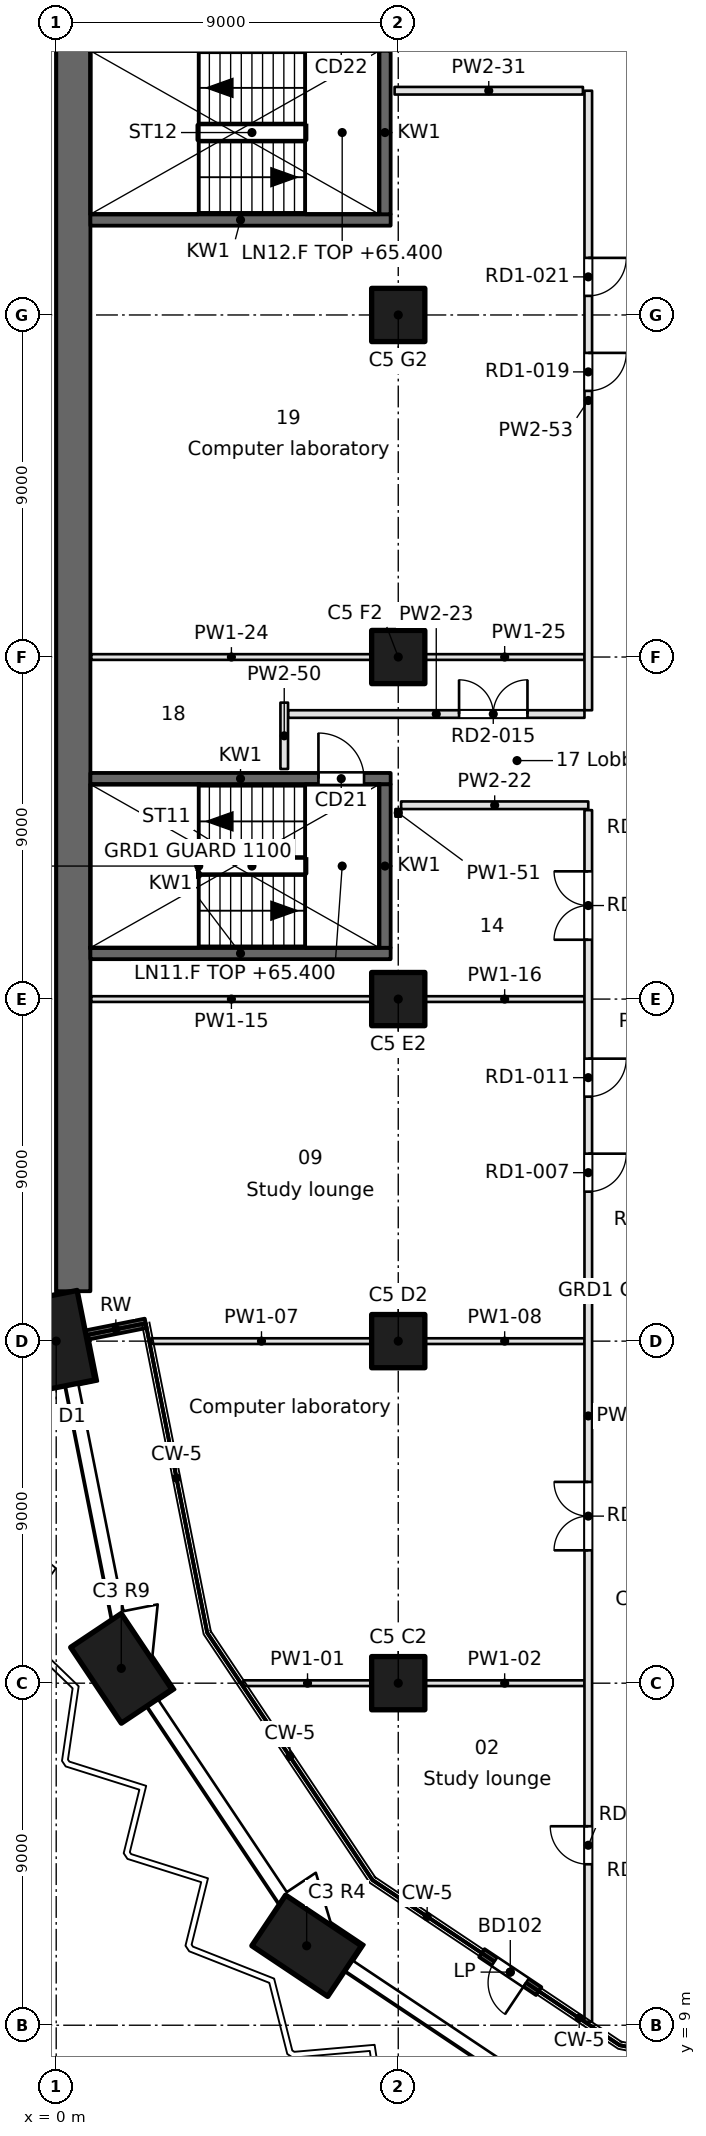
"""IFC4 building model, lengths in metres.
Left out: names, types, materials, properties, quantities, classifications, styles, units other than length and angle.
Written with IfcOpenShell. Run it as: python <this file> out.ifc"""

import sys

from ifc_helpers import new_model, si_unit, direction, frame, frame_2d, origin, origin_2d, place, context, subcontext, project, spatial, rectangle, extrude, element, fill, save


model = new_model("IFC4")
c1 = context("Model", 3, precision=1e-05, world=origin(), true_north=direction((0.0, 1.0)))
c2 = subcontext(c1, "Body", "Model", "MODEL_VIEW")
j1 = project(units=[si_unit("LENGTHUNIT", "METRE"), si_unit("PLANEANGLEUNIT", "RADIAN")], contexts=[c1])
p1 = place(None, origin())
s1 = spatial("IfcSite", under=j1, at=p1, CompositionType="ELEMENT")
p2 = place(p1, origin())
s2 = spatial("IfcBuilding", under=s1, at=p2, CompositionType="ELEMENT")
p3 = place(p2, frame((0.0, 0.0, 65.4)))
s3 = spatial("IfcBuildingStorey", under=s2, at=p3, CompositionType="ELEMENT", Elevation=65.4)
for number, where, z_axis, x_axis in (
    (1, (6.59, 11.09, 0.0), (0.0, 0.0, 1.0), (-0.831, 0.556, 0.0)),
    (2, (1.713, 18.39, 0.0), (0.0, 0.0, 1.0), (-0.556, 0.831, 0.0)),
    (3, (0.0, 27.0, 0.0), (0.0, 0.0, 1.0), (-0.195, 0.981, 0.0)),
):
    element("IfcColumn", number, at=place(p3, frame(where, z_axis=z_axis, x_axis=x_axis)), inside=s3, PredefinedType="COLUMN", context=c2, shape_type="SweptSolid", body=[
        extrude(rectangle(XDim=2.4, YDim=1.6, at=origin_2d()), origin(), (0.0, 0.0, 1.0), 3.7),
    ])
for number, where, z_axis, x_axis in (
    (4, (9.0, 18.0, 0.0), (0.0, 0.0, 1.0), (1.0, 0.0, 0.0)),
    (5, (9.0, 27.0, 0.0), (0.0, 0.0, 1.0), (1.0, 0.0, 0.0)),
    (6, (9.0, 36.0, 0.0), (0.0, 0.0, 1.0), (1.0, 0.0, 0.0)),
    (7, (9.0, 45.0, 0.0), (0.0, 0.0, 1.0), (1.0, 0.0, 0.0)),
    (8, (9.0, 54.0, 0.0), (0.0, 0.0, 1.0), (1.0, 0.0, 0.0)),
):
    element("IfcColumn", number, at=place(p3, frame(where, z_axis=z_axis, x_axis=x_axis)), inside=s3, PredefinedType="COLUMN", context=c2, shape_type="SweptSolid", body=[
        extrude(rectangle(XDim=1.4, YDim=1.4, at=origin_2d()), origin(), (0.0, 0.0, 1.0), 3.7),
    ])
p4 = place(p3, frame((0.45, 94.5, 0.0), z_axis=(0.0, 0.0, 1.0), x_axis=(0.0, -1.0, 0.0)))
e9 = element("IfcWall", 9, at=p4, inside=s3, PredefinedType="SHEAR", context=c2, shape_type="SweptSolid", body=[
    extrude(rectangle(XDim=66.187, YDim=0.9, at=frame_2d((33.094, 0.0))), origin(), (0.0, 0.0, 1.0), 3.7),
])
p5 = place(p3, frame((0.784, 27.157, 0.0), z_axis=(0.0, 0.0, 1.0), x_axis=(0.980826234823, 0.19488431718, 0.0)))
e10 = element("IfcWall", 10, at=p5, inside=s3, PredefinedType="SOLIDWALL", context=c2, shape_type="SweptSolid", body=[
    extrude(rectangle(XDim=1.601, YDim=0.25, at=frame_2d((0.801, 0.0))), origin(), (0.0, 0.0, 1.0), 3.3),
])
p6 = place(p3, frame((11.2, 10.898, 0.0), z_axis=(0.0, 0.0, 1.0), x_axis=(0.83146554274, -0.555576323502, 0.0)))
e11 = element("IfcWall", 11, at=p6, inside=s3, PredefinedType="SOLIDWALL", context=c2, shape_type="SweptSolid", body=[
    extrude(rectangle(XDim=1.8, YDim=0.25, at=frame_2d((0.9, 0.0))), origin(), (0.0, 0.0, 1.0), 3.3),
])
p7 = place(p6, frame((0.4, 0.0, 0.0)))
e12 = element("IfcOpeningElement", 12, at=p7, cuts=e11, PredefinedType="OPENING", context=c2, shape_type="SweptSolid", body=[
    extrude(rectangle(XDim=1.0, YDim=2.1, at=frame_2d((0.5, 1.05))), frame((0.0, 0.125, 0.0), z_axis=(0.0, -1.0, 0.0), x_axis=(1.0, 0.0, 0.0)), (0.0, 0.0, 1.0), 0.25),
])
p8 = place(p3, frame((0.9, 37.2, -0.4), z_axis=(0.0, 0.0, 1.0), x_axis=(1.0, 0.0, 0.0)))
e13 = element("IfcWall", 13, at=p8, inside=s3, PredefinedType="SOLIDWALL", context=c2, shape_type="SweptSolid", body=[
    extrude(rectangle(XDim=7.9, YDim=0.3, at=frame_2d((3.95, 0.0))), origin(), (0.0, 0.0, 1.0), 3.7),
])
p9 = place(p3, frame((0.9, 41.8, -0.4), z_axis=(0.0, 0.0, 1.0), x_axis=(1.0, 0.0, 0.0)))
e14 = element("IfcWall", 14, at=p9, inside=s3, PredefinedType="SOLIDWALL", context=c2, shape_type="SweptSolid", body=[
    extrude(rectangle(XDim=7.9, YDim=0.3, at=frame_2d((3.95, 0.0))), origin(), (0.0, 0.0, 1.0), 3.7),
])
p10 = place(p9, frame((6.0, 0.0, 0.4)))
e15 = element("IfcOpeningElement", 15, at=p10, cuts=e14, PredefinedType="OPENING", context=c2, shape_type="SweptSolid", body=[
    extrude(rectangle(XDim=1.2, YDim=2.1, at=frame_2d((0.6, 1.05))), frame((0.0, 0.15, 0.0), z_axis=(0.0, -1.0, 0.0), x_axis=(1.0, 0.0, 0.0)), (0.0, 0.0, 1.0), 0.3),
])
p11 = place(p3, frame((0.9, 56.5, -0.4), z_axis=(0.0, 0.0, 1.0), x_axis=(1.0, 0.0, 0.0)))
e16 = element("IfcWall", 16, at=p11, inside=s3, PredefinedType="SOLIDWALL", context=c2, shape_type="SweptSolid", body=[
    extrude(rectangle(XDim=7.9, YDim=0.3, at=frame_2d((3.95, 0.0))), origin(), (0.0, 0.0, 1.0), 3.7),
])
p12 = place(p3, frame((8.65, 37.35, -0.4), z_axis=(0.0, 0.0, 1.0), x_axis=(0.0, 1.0, 0.0)))
e17 = element("IfcWall", 17, at=p12, inside=s3, PredefinedType="SOLIDWALL", context=c2, shape_type="SweptSolid", body=[
    extrude(rectangle(XDim=4.3, YDim=0.3, at=frame_2d((2.15, 0.0))), origin(), (0.0, 0.0, 1.0), 3.7),
])
p13 = place(p3, frame((8.65, 56.65, -0.4), z_axis=(0.0, 0.0, 1.0), x_axis=(0.0, 1.0, 0.0)))
e18 = element("IfcWall", 18, at=p13, inside=s3, PredefinedType="SOLIDWALL", context=c2, shape_type="SweptSolid", body=[
    extrude(rectangle(XDim=4.3, YDim=0.3, at=frame_2d((2.15, 0.0))), origin(), (0.0, 0.0, 1.0), 3.7),
])
p14 = place(p3, frame((4.926, 18.0, 0.0), z_axis=(0.0, 0.0, 1.0), x_axis=(1.0, 0.0, 0.0)))
e19 = element("IfcWall", 19, at=p14, inside=s3, PredefinedType="PARTITIONING", context=c2, shape_type="SweptSolid", body=[
    extrude(rectangle(XDim=3.375, YDim=0.15, at=frame_2d((1.687, 0.0))), origin(), (0.0, 0.0, 1.0), 3.3),
])
p15 = place(p3, frame((9.7, 18.0, 0.0), z_axis=(0.0, 0.0, 1.0), x_axis=(1.0, 0.0, 0.0)))
e20 = element("IfcWall", 20, at=p15, inside=s3, PredefinedType="PARTITIONING", context=c2, shape_type="SweptSolid", body=[
    extrude(rectangle(XDim=4.2, YDim=0.15, at=frame_2d((2.1, 0.0))), origin(), (0.0, 0.0, 1.0), 3.3),
])
p16 = place(p3, frame((2.503, 27.0, 0.0), z_axis=(0.0, 0.0, 1.0), x_axis=(1.0, 0.0, 0.0)))
e21 = element("IfcWall", 21, at=p16, inside=s3, PredefinedType="PARTITIONING", context=c2, shape_type="SweptSolid", body=[
    extrude(rectangle(XDim=5.797, YDim=0.15, at=frame_2d((2.898, 0.0))), origin(), (0.0, 0.0, 1.0), 3.3),
])
p17 = place(p3, frame((9.7, 27.0, 0.0), z_axis=(0.0, 0.0, 1.0), x_axis=(1.0, 0.0, 0.0)))
e22 = element("IfcWall", 22, at=p17, inside=s3, PredefinedType="PARTITIONING", context=c2, shape_type="SweptSolid", body=[
    extrude(rectangle(XDim=4.2, YDim=0.15, at=frame_2d((2.1, 0.0))), origin(), (0.0, 0.0, 1.0), 3.3),
])
p18 = place(p3, frame((0.92, 36.0, 0.0), z_axis=(0.0, 0.0, 1.0), x_axis=(1.0, 0.0, 0.0)))
e23 = element("IfcWall", 23, at=p18, inside=s3, PredefinedType="PARTITIONING", context=c2, shape_type="SweptSolid", body=[
    extrude(rectangle(XDim=7.38, YDim=0.15, at=frame_2d((3.69, 0.0))), origin(), (0.0, 0.0, 1.0), 3.3),
])
p19 = place(p3, frame((9.7, 36.0, 0.0), z_axis=(0.0, 0.0, 1.0), x_axis=(1.0, 0.0, 0.0)))
e24 = element("IfcWall", 24, at=p19, inside=s3, PredefinedType="PARTITIONING", context=c2, shape_type="SweptSolid", body=[
    extrude(rectangle(XDim=4.2, YDim=0.15, at=frame_2d((2.1, 0.0))), origin(), (0.0, 0.0, 1.0), 3.3),
])
p20 = place(p3, frame((14.0, 41.1, 0.0), z_axis=(0.0, 0.0, 1.0), x_axis=(-1.0, 0.0, 0.0)))
e25 = element("IfcWall", 25, at=p20, inside=s3, PredefinedType="PARTITIONING", context=c2, shape_type="SweptSolid", body=[
    extrude(rectangle(XDim=4.925, YDim=0.2, at=frame_2d((2.462, 0.0))), origin(), (0.0, 0.0, 1.0), 3.3),
])
p21 = place(p3, frame((6.1, 43.5, 0.0), z_axis=(0.0, 0.0, 1.0), x_axis=(1.0, 0.0, 0.0)))
e26 = element("IfcWall", 26, at=p21, inside=s3, PredefinedType="PARTITIONING", context=c2, shape_type="SweptSolid", body=[
    extrude(rectangle(XDim=7.8, YDim=0.2, at=frame_2d((3.9, 0.0))), origin(), (0.0, 0.0, 1.0), 3.3),
])
p22 = place(p21, frame((4.5, 0.0, 0.0)))
e27 = element("IfcOpeningElement", 27, at=p22, cuts=e26, PredefinedType="OPENING", context=c2, shape_type="SweptSolid", body=[
    extrude(rectangle(XDim=1.8, YDim=2.1, at=frame_2d((0.9, 1.05))), frame((0.0, 0.1, 0.0), z_axis=(0.0, -1.0, 0.0), x_axis=(1.0, 0.0, 0.0)), (0.0, 0.0, 1.0), 0.2),
])
p23 = place(p3, frame((0.92, 45.0, 0.0), z_axis=(0.0, 0.0, 1.0), x_axis=(1.0, 0.0, 0.0)))
e28 = element("IfcWall", 28, at=p23, inside=s3, PredefinedType="PARTITIONING", context=c2, shape_type="SweptSolid", body=[
    extrude(rectangle(XDim=7.38, YDim=0.15, at=frame_2d((3.69, 0.0))), origin(), (0.0, 0.0, 1.0), 3.3),
])
p24 = place(p3, frame((9.7, 45.0, 0.0), z_axis=(0.0, 0.0, 1.0), x_axis=(1.0, 0.0, 0.0)))
e29 = element("IfcWall", 29, at=p24, inside=s3, PredefinedType="PARTITIONING", context=c2, shape_type="SweptSolid", body=[
    extrude(rectangle(XDim=4.2, YDim=0.15, at=frame_2d((2.1, 0.0))), origin(), (0.0, 0.0, 1.0), 3.3),
])
p25 = place(p3, frame((13.859, 59.9, 0.0), z_axis=(0.0, 0.0, 1.0), x_axis=(-1.0, 0.0, 0.0)))
e30 = element("IfcWall", 30, at=p25, inside=s3, PredefinedType="PARTITIONING", context=c2, shape_type="SweptSolid", body=[
    extrude(rectangle(XDim=4.955, YDim=0.2, at=frame_2d((2.478, 0.0))), origin(), (0.0, 0.0, 1.0), 3.3),
])
p26 = place(p3, frame((6.0, 42.054, 0.0), z_axis=(0.0, 0.0, 1.0), x_axis=(0.0, 1.0, 0.0)))
e31 = element("IfcWall", 31, at=p26, inside=s3, PredefinedType="PARTITIONING", context=c2, shape_type="SweptSolid", body=[
    extrude(rectangle(XDim=1.746, YDim=0.2, at=frame_2d((0.873, 0.0))), origin(), (0.0, 0.0, 1.0), 3.3),
])
p27 = place(p3, frame((9.0, 41.0, 0.0), z_axis=(0.0, 0.0, 1.0), x_axis=(0.0, -1.0, 0.0)))
e32 = element("IfcWall", 32, at=p27, inside=s3, PredefinedType="PARTITIONING", context=c2, shape_type="SweptSolid", body=[
    extrude(rectangle(XDim=0.2, YDim=0.15, at=frame_2d((0.1, 0.0))), origin(), (0.0, 0.0, 1.0), 3.3),
])
p28 = place(p3, frame((14.0, 9.092, 0.0), z_axis=(0.0, 0.0, 1.0), x_axis=(0.0, 1.0, 0.0)))
e33 = element("IfcWall", 33, at=p28, inside=s3, PredefinedType="PARTITIONING", context=c2, shape_type="SweptSolid", body=[
    extrude(rectangle(XDim=31.88, YDim=0.2, at=frame_2d((15.94, 0.0))), origin(), (0.0, 0.0, 1.0), 3.3),
])
p29 = place(p28, frame((4.144, 0.0, 0.0)))
e34 = element("IfcOpeningElement", 34, at=p29, cuts=e33, PredefinedType="OPENING", context=c2, shape_type="SweptSolid", body=[
    extrude(rectangle(XDim=1.0, YDim=2.1, at=frame_2d((0.5, 1.05))), frame((0.0, 0.1, 0.0), z_axis=(0.0, -1.0, 0.0), x_axis=(1.0, 0.0, 0.0)), (0.0, 0.0, 1.0), 0.2),
])
p30 = place(p28, frame((12.404, 0.0, 0.0)))
e35 = element("IfcOpeningElement", 35, at=p30, cuts=e33, PredefinedType="OPENING", context=c2, shape_type="SweptSolid", body=[
    extrude(rectangle(XDim=1.8, YDim=2.1, at=frame_2d((0.9, 1.05))), frame((0.0, 0.1, 0.0), z_axis=(0.0, -1.0, 0.0), x_axis=(1.0, 0.0, 0.0)), (0.0, 0.0, 1.0), 0.2),
])
p31 = place(p28, frame((21.841, 0.0, 0.0)))
e36 = element("IfcOpeningElement", 36, at=p31, cuts=e33, PredefinedType="OPENING", context=c2, shape_type="SweptSolid", body=[
    extrude(rectangle(XDim=1.0, YDim=2.1, at=frame_2d((0.5, 1.05))), frame((0.0, 0.1, 0.0), z_axis=(0.0, -1.0, 0.0), x_axis=(1.0, 0.0, 0.0)), (0.0, 0.0, 1.0), 0.2),
])
p32 = place(p28, frame((24.341, 0.0, 0.0)))
e37 = element("IfcOpeningElement", 37, at=p32, cuts=e33, PredefinedType="OPENING", context=c2, shape_type="SweptSolid", body=[
    extrude(rectangle(XDim=1.0, YDim=2.1, at=frame_2d((0.5, 1.05))), frame((0.0, 0.1, 0.0), z_axis=(0.0, -1.0, 0.0), x_axis=(1.0, 0.0, 0.0)), (0.0, 0.0, 1.0), 0.2),
])
p33 = place(p28, frame((28.469, 0.0, 0.0)))
e38 = element("IfcOpeningElement", 38, at=p33, cuts=e33, PredefinedType="OPENING", context=c2, shape_type="SweptSolid", body=[
    extrude(rectangle(XDim=1.8, YDim=2.1, at=frame_2d((0.9, 1.05))), frame((0.0, 0.1, 0.0), z_axis=(0.0, -1.0, 0.0), x_axis=(1.0, 0.0, 0.0)), (0.0, 0.0, 1.0), 0.2),
])
p34 = place(p3, frame((14.0, 43.6, 0.0), z_axis=(0.0, 0.0, 1.0), x_axis=(0.0, 1.0, 0.0)))
e39 = element("IfcWall", 39, at=p34, inside=s3, PredefinedType="PARTITIONING", context=c2, shape_type="SweptSolid", body=[
    extrude(rectangle(XDim=16.3, YDim=0.2, at=frame_2d((8.15, 0.0))), origin(), (0.0, 0.0, 1.0), 3.3),
])
p35 = place(p34, frame((8.402, 0.0, 0.0)))
e40 = element("IfcOpeningElement", 40, at=p35, cuts=e39, PredefinedType="OPENING", context=c2, shape_type="SweptSolid", body=[
    extrude(rectangle(XDim=1.0, YDim=2.1, at=frame_2d((0.5, 1.05))), frame((0.0, 0.1, 0.0), z_axis=(0.0, -1.0, 0.0), x_axis=(1.0, 0.0, 0.0)), (0.0, 0.0, 1.0), 0.2),
])
p36 = place(p34, frame((10.902, 0.0, 0.0)))
e41 = element("IfcOpeningElement", 41, at=p36, cuts=e39, PredefinedType="OPENING", context=c2, shape_type="SweptSolid", body=[
    extrude(rectangle(XDim=1.0, YDim=2.1, at=frame_2d((0.5, 1.05))), frame((0.0, 0.1, 0.0), z_axis=(0.0, -1.0, 0.0), x_axis=(1.0, 0.0, 0.0)), (0.0, 0.0, 1.0), 0.2),
])
p37 = place(p7, frame((1.0, 0.0, 0.0), z_axis=(0.0, 0.0, 1.0), x_axis=(-1.0, 0.0, 0.0)))
e42 = element("IfcDoor", 42, at=p37, inside=s3, OperationType="SINGLE_SWING_LEFT", PredefinedType="DOOR", context=c2, shape_type="SweptSolid", body=[
    extrude(rectangle(XDim=1.0, YDim=2.1, at=frame_2d((0.5, 1.05))), frame((0.0, 0.025, 0.0), z_axis=(0.0, -1.0, 0.0), x_axis=(1.0, 0.0, 0.0)), (0.0, 0.0, 1.0), 0.05),
])
fill(e12, e42)
p38 = place(p10, origin())
e43 = element("IfcDoor", 43, at=p38, inside=s3, OperationType="SINGLE_SWING_LEFT", PredefinedType="DOOR", context=c2, shape_type="SweptSolid", body=[
    extrude(rectangle(XDim=1.2, YDim=2.1, at=frame_2d((0.6, 1.05))), frame((0.0, 0.025, 0.0), z_axis=(0.0, -1.0, 0.0), x_axis=(1.0, 0.0, 0.0)), (0.0, 0.0, 1.0), 0.05),
])
fill(e15, e43)
p39 = place(p29, origin())
e44 = element("IfcDoor", 44, at=p39, inside=s3, OperationType="SINGLE_SWING_RIGHT", PredefinedType="DOOR", context=c2, shape_type="SweptSolid", body=[
    extrude(rectangle(XDim=1.0, YDim=2.1, at=frame_2d((0.5, 1.05))), frame((0.0, 0.025, 0.0), z_axis=(0.0, -1.0, 0.0), x_axis=(1.0, 0.0, 0.0)), (0.0, 0.0, 1.0), 0.05),
])
fill(e34, e44)
p40 = place(p30, origin())
e45 = element("IfcDoor", 45, at=p40, inside=s3, OperationType="DOUBLE_DOOR_SINGLE_SWING", PredefinedType="DOOR", context=c2, shape_type="SweptSolid", body=[
    extrude(rectangle(XDim=1.8, YDim=2.1, at=frame_2d((0.9, 1.05))), frame((0.0, 0.025, 0.0), z_axis=(0.0, -1.0, 0.0), x_axis=(1.0, 0.0, 0.0)), (0.0, 0.0, 1.0), 0.05),
])
fill(e35, e45)
p41 = place(p31, frame((1.0, 0.0, 0.0), z_axis=(0.0, 0.0, 1.0), x_axis=(-1.0, 0.0, 0.0)))
e46 = element("IfcDoor", 46, at=p41, inside=s3, OperationType="SINGLE_SWING_LEFT", PredefinedType="DOOR", context=c2, shape_type="SweptSolid", body=[
    extrude(rectangle(XDim=1.0, YDim=2.1, at=frame_2d((0.5, 1.05))), frame((0.0, 0.025, 0.0), z_axis=(0.0, -1.0, 0.0), x_axis=(1.0, 0.0, 0.0)), (0.0, 0.0, 1.0), 0.05),
])
fill(e36, e46)
p42 = place(p32, frame((1.0, 0.0, 0.0), z_axis=(0.0, 0.0, 1.0), x_axis=(-1.0, 0.0, 0.0)))
e47 = element("IfcDoor", 47, at=p42, inside=s3, OperationType="SINGLE_SWING_LEFT", PredefinedType="DOOR", context=c2, shape_type="SweptSolid", body=[
    extrude(rectangle(XDim=1.0, YDim=2.1, at=frame_2d((0.5, 1.05))), frame((0.0, 0.025, 0.0), z_axis=(0.0, -1.0, 0.0), x_axis=(1.0, 0.0, 0.0)), (0.0, 0.0, 1.0), 0.05),
])
fill(e37, e47)
p43 = place(p33, origin())
e48 = element("IfcDoor", 48, at=p43, inside=s3, OperationType="DOUBLE_DOOR_SINGLE_SWING", PredefinedType="DOOR", context=c2, shape_type="SweptSolid", body=[
    extrude(rectangle(XDim=1.8, YDim=2.1, at=frame_2d((0.9, 1.05))), frame((0.0, 0.025, 0.0), z_axis=(0.0, -1.0, 0.0), x_axis=(1.0, 0.0, 0.0)), (0.0, 0.0, 1.0), 0.05),
])
fill(e38, e48)
p44 = place(p22, origin())
e49 = element("IfcDoor", 49, at=p44, inside=s3, OperationType="DOUBLE_DOOR_SINGLE_SWING", PredefinedType="DOOR", context=c2, shape_type="SweptSolid", body=[
    extrude(rectangle(XDim=1.8, YDim=2.1, at=frame_2d((0.9, 1.05))), frame((0.0, 0.025, 0.0), z_axis=(0.0, -1.0, 0.0), x_axis=(1.0, 0.0, 0.0)), (0.0, 0.0, 1.0), 0.05),
])
fill(e27, e49)
p45 = place(p35, frame((1.0, 0.0, 0.0), z_axis=(0.0, 0.0, 1.0), x_axis=(-1.0, 0.0, 0.0)))
e50 = element("IfcDoor", 50, at=p45, inside=s3, OperationType="SINGLE_SWING_LEFT", PredefinedType="DOOR", context=c2, shape_type="SweptSolid", body=[
    extrude(rectangle(XDim=1.0, YDim=2.1, at=frame_2d((0.5, 1.05))), frame((0.0, 0.025, 0.0), z_axis=(0.0, -1.0, 0.0), x_axis=(1.0, 0.0, 0.0)), (0.0, 0.0, 1.0), 0.05),
])
fill(e40, e50)
p46 = place(p36, frame((1.0, 0.0, 0.0), z_axis=(0.0, 0.0, 1.0), x_axis=(-1.0, 0.0, 0.0)))
e51 = element("IfcDoor", 51, at=p46, inside=s3, OperationType="SINGLE_SWING_LEFT", PredefinedType="DOOR", context=c2, shape_type="SweptSolid", body=[
    extrude(rectangle(XDim=1.0, YDim=2.1, at=frame_2d((0.5, 1.05))), frame((0.0, 0.025, 0.0), z_axis=(0.0, -1.0, 0.0), x_axis=(1.0, 0.0, 0.0)), (0.0, 0.0, 1.0), 0.05),
])
fill(e41, e51)
save(model, sys.argv[1])
